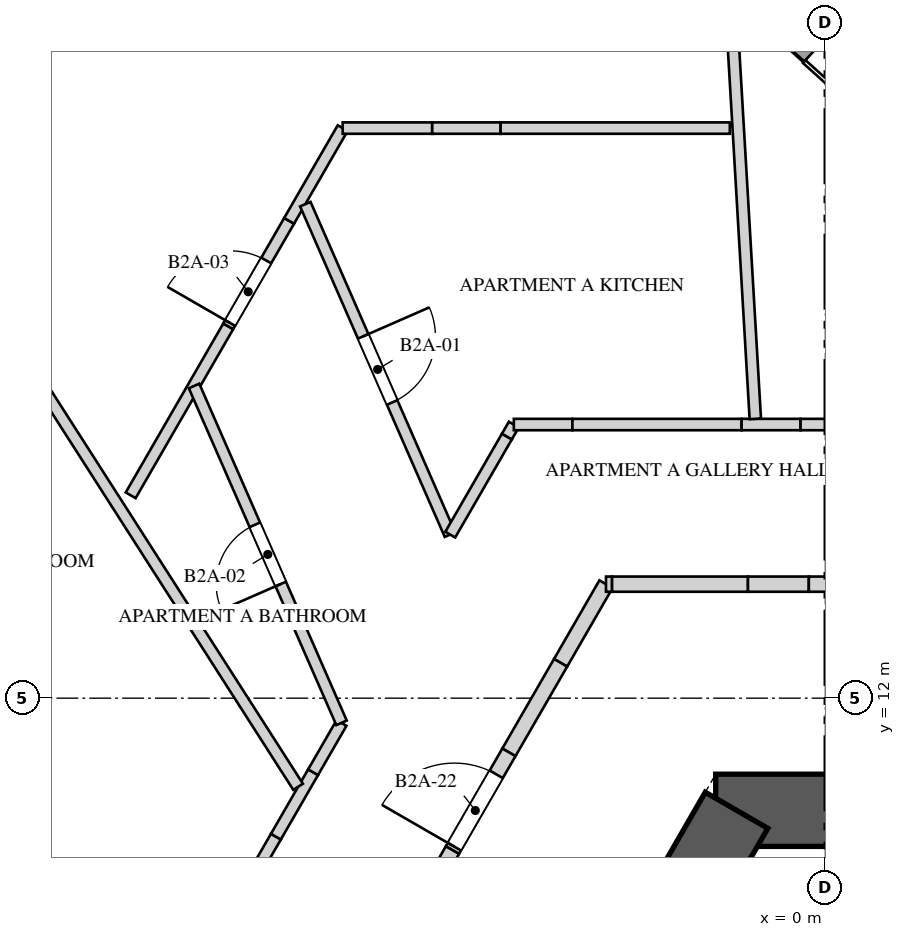
"""IFC4 building model, lengths in metres.
Left out: names, types, materials, properties, quantities, classifications, styles, units other than length and angle.
Written with IfcOpenShell. Run it as: python <this file> out.ifc"""

import sys

from ifc_helpers import new_model, si_unit, direction, frame, frame_2d, origin, place, context, subcontext, project, spatial, polyline, rectangle, outline, extrude, element, fill, save


model = new_model("IFC4")
c1 = context("Model", 3, precision=1e-05, world=origin(), true_north=direction((0.0, 1.0)))
c2 = subcontext(c1, "Body", "Model", "MODEL_VIEW")
j1 = project(units=[si_unit("LENGTHUNIT", "METRE"), si_unit("PLANEANGLEUNIT", "RADIAN")], contexts=[c1])
p1 = place(None, origin())
s1 = spatial("IfcSite", under=j1, at=p1, CompositionType="ELEMENT")
p2 = place(p1, origin())
s2 = spatial("IfcBuilding", under=s1, at=p2, CompositionType="ELEMENT")
p3 = place(p2, frame((0.0, 0.0, 88.4)))
s3 = spatial("IfcBuildingStorey", under=s2, at=p3, CompositionType="ELEMENT", Elevation=88.4)
p4 = place(p3, frame((1.443, 10.525, 0.0), z_axis=(0.0, 0.0, 1.0), x_axis=(-1.0, 0.0, 0.0)))
e1 = element("IfcWall", 1, at=p4, inside=s3, PredefinedType="SHEAR", context=c2, shape_type="SweptSolid", body=[
    extrude(rectangle(XDim=2.887, YDim=0.95, at=frame_2d((1.443, 0.0))), origin(), (0.0, 0.0, 1.0), 4.0),
])
p5 = place(p3, frame((-1.169, 10.525, 0.0), z_axis=(0.0, 0.0, 1.0), x_axis=(-0.499999102847, -0.866025921755, 0.0)))
e2 = element("IfcWall", 2, at=p5, inside=s3, PredefinedType="SHEAR", context=c2, shape_type="SweptSolid", body=[
    extrude(rectangle(XDim=17.061, YDim=0.95, at=frame_2d((8.53, 0.0))), origin(), (0.0, 0.0, 1.0), 4.0),
])
p6 = place(p5, frame((6.735, 0.0, 0.0)))
e3 = element("IfcOpeningElement", 3, at=p6, cuts=e2, PredefinedType="OPENING", context=c2, shape_type="SweptSolid", body=[
    extrude(rectangle(XDim=1.0, YDim=2.4, at=frame_2d((0.5, 1.2))), frame((0.0, 0.485, 0.0), z_axis=(0.0, -1.0, 0.0), x_axis=(1.0, 0.0, 0.0)), (0.0, 0.0, 1.0), 0.97),
])
p7 = place(p5, frame((14.613, 0.0, 0.0)))
e4 = element("IfcOpeningElement", 4, at=p7, cuts=e2, PredefinedType="OPENING", context=c2, shape_type="SweptSolid", body=[
    extrude(rectangle(XDim=0.8, YDim=2.1, at=frame_2d((0.4, 1.05))), frame((0.0, 0.485, 0.0), z_axis=(0.0, -1.0, 0.0), x_axis=(1.0, 0.0, 0.0)), (0.0, 0.0, 1.0), 0.97),
])
p8 = place(p3, frame((1.3, 19.149, 0.0), z_axis=(0.0, 0.0, 1.0), x_axis=(-0.743182653308, 0.669088591909, 0.0)))
e5 = element("IfcWall", 5, at=p8, inside=s3, PredefinedType="SOLIDWALL", context=c2, shape_type="SweptSolid", body=[
    extrude(rectangle(XDim=2.287, YDim=0.3, at=frame_2d((1.143, 0.0))), origin(), (0.0, 0.0, 1.0), 3.3),
])
p9 = place(p8, frame((0.293, 0.0, 0.0)))
e6 = element("IfcOpeningElement", 6, at=p9, cuts=e5, PredefinedType="OPENING", context=c2, shape_type="SweptSolid", body=[
    extrude(rectangle(XDim=1.7, YDim=2.4, at=frame_2d((0.85, 1.2))), frame((0.0, 0.16, 0.0), z_axis=(0.0, -1.0, 0.0), x_axis=(1.0, 0.0, 0.0)), (0.0, 0.0, 1.0), 0.32),
])
p10 = place(p3, frame((-8.809, 7.442, 0.0), z_axis=(0.0, 0.0, 1.0), x_axis=(0.500003371769, 0.866023457084, 0.0)))
e7 = element("IfcWall", 7, at=p10, inside=s3, PredefinedType="PARTITIONING", context=c2, shape_type="SweptSolid", body=[
    extrude(rectangle(XDim=3.16, YDim=0.15, at=frame_2d((1.58, 0.0))), origin(), (0.0, 0.0, 1.0), 3.65),
])
p11 = place(p10, frame((1.307, 0.0, 0.0)))
e8 = element("IfcOpeningElement", 8, at=p11, cuts=e7, PredefinedType="OPENING", context=c2, shape_type="SweptSolid", body=[
    extrude(rectangle(XDim=0.95, YDim=2.4, at=frame_2d((0.475, 1.2))), frame((0.0, 0.085, 0.0), z_axis=(0.0, -1.0, 0.0), x_axis=(1.0, 0.0, 0.0)), (0.0, 0.0, 1.0), 0.17),
])
p12 = place(p3, frame((-7.229, 10.178, 0.0), z_axis=(0.0, 0.0, 1.0), x_axis=(0.500082280366, 0.865977893981, 0.0)))
e9 = element("IfcWall", 9, at=p12, inside=s3, PredefinedType="PARTITIONING", context=c2, shape_type="SweptSolid", body=[
    extrude(rectangle(XDim=0.979, YDim=0.15, at=frame_2d((0.489, 0.0))), origin(), (0.0, 0.0, 1.0), 2.55),
])
p13 = place(p3, frame((-6.74, 11.026, 0.0), z_axis=(0.0, 0.0, 1.0), x_axis=(0.499826079786, 0.866125793385, 0.0)))
e10 = element("IfcWall", 10, at=p13, inside=s3, PredefinedType="PARTITIONING", context=c2, shape_type="SweptSolid", body=[
    extrude(rectangle(XDim=0.748, YDim=0.15, at=frame_2d((0.374, 0.0))), origin(), (0.0, 0.0, 1.0), 3.65),
])
p14 = place(p3, frame((-9.14, 14.669, 0.0), z_axis=(0.0, 0.0, 1.0), x_axis=(0.500016107458, 0.866016103939, 0.0)))
e11 = element("IfcWall", 11, at=p14, inside=s3, PredefinedType="PARTITIONING", context=c2, shape_type="SweptSolid", body=[
    extrude(rectangle(XDim=2.567, YDim=0.15, at=frame_2d((1.283, 0.0))), origin(), (0.0, 0.0, 1.0), 3.65),
])
p15 = place(p3, frame((-7.857, 16.892, 0.0), z_axis=(0.0, 0.0, 1.0), x_axis=(0.499973003918, 0.866040989419, 0.0)))
e12 = element("IfcWall", 12, at=p15, inside=s3, PredefinedType="PARTITIONING", context=c2, shape_type="SweptSolid", body=[
    extrude(outline(polyline([(0.0, 0.0), (1.603, 0.0), (1.603, 2.55), (0.498, 2.55), (0.498, 3.65), (0.0, 3.65), (0.0, 0.0)])), frame((0.0, 0.075, 0.0), z_axis=(0.0, -1.0, 0.0), x_axis=(1.0, 0.0, 0.0)), (0.0, 0.0, 1.0), 0.15),
])
p16 = place(p15, frame((0.05, 0.0, 0.0)))
e13 = element("IfcOpeningElement", 13, at=p16, cuts=e12, PredefinedType="OPENING", context=c2, shape_type="SweptSolid", body=[
    extrude(rectangle(XDim=0.95, YDim=2.4, at=frame_2d((0.475, 1.2))), frame((0.0, 0.085, 0.0), z_axis=(0.0, -1.0, 0.0), x_axis=(1.0, 0.0, 0.0)), (0.0, 0.0, 1.0), 0.17),
])
p17 = place(p3, frame((-7.055, 18.28, 0.0), z_axis=(0.0, 0.0, 1.0), x_axis=(0.500052415518, 0.865995139556, 0.0)))
e14 = element("IfcWall", 14, at=p17, inside=s3, PredefinedType="PARTITIONING", context=c2, shape_type="SweptSolid", body=[
    extrude(rectangle(XDim=1.409, YDim=0.15, at=frame_2d((0.705, 0.0))), origin(), (0.0, 0.0, 1.0), 3.65),
])
p18 = place(p3, frame((-9.004, 7.255, 0.0), z_axis=(0.0, 0.0, 1.0), x_axis=(-0.778684200607, 0.627416062692, 0.0)))
e15 = element("IfcWall", 15, at=p18, inside=s3, PredefinedType="PARTITIONING", context=c2, shape_type="SweptSolid", body=[
    extrude(rectangle(XDim=7.605, YDim=0.15, at=frame_2d((3.802, 0.0))), origin(), (0.0, 0.0, 1.0), 2.75),
])
p19 = place(p3, frame((-6.938, 10.834, 0.0), z_axis=(0.0, 0.0, 1.0), x_axis=(-0.539252318239, 0.842144249683, 0.0)))
e16 = element("IfcWall", 16, at=p19, inside=s3, PredefinedType="PARTITIONING", context=c2, shape_type="SweptSolid", body=[
    extrude(rectangle(XDim=11.475, YDim=0.15, at=frame_2d((5.737, 0.0))), origin(), (0.0, 0.0, 1.0), 2.55),
])
p20 = place(p3, frame((-6.842, 18.499, 0.0), z_axis=(0.0, 0.0, 1.0), x_axis=(0.400991537582, -0.916081757698, 0.0)))
e17 = element("IfcWall", 17, at=p20, inside=s3, PredefinedType="PARTITIONING", context=c2, shape_type="SweptSolid", body=[
    extrude(rectangle(XDim=4.746, YDim=0.15, at=frame_2d((2.373, 0.0))), origin(), (0.0, 0.0, 1.0), 3.65),
])
p21 = place(p20, frame((1.898, 0.0, 0.0)))
e18 = element("IfcOpeningElement", 18, at=p21, cuts=e17, PredefinedType="OPENING", context=c2, shape_type="SweptSolid", body=[
    extrude(rectangle(XDim=0.95, YDim=2.4, at=frame_2d((0.475, 1.2))), frame((0.0, 0.085, 0.0), z_axis=(0.0, -1.0, 0.0), x_axis=(1.0, 0.0, 0.0)), (0.0, 0.0, 1.0), 0.17),
])
p22 = place(p3, frame((-6.366, 11.675, 0.0), z_axis=(0.0, 0.0, 1.0), x_axis=(-0.401014713365, 0.916071612738, 0.0)))
e19 = element("IfcWall", 19, at=p22, inside=s3, PredefinedType="PARTITIONING", context=c2, shape_type="SweptSolid", body=[
    extrude(rectangle(XDim=4.838, YDim=0.15, at=frame_2d((2.419, 0.0))), origin(), (0.0, 0.0, 1.0), 3.65),
])
p23 = place(p22, frame((1.994, 0.0, 0.0)))
e20 = element("IfcOpeningElement", 20, at=p23, cuts=e19, PredefinedType="OPENING", context=c2, shape_type="SweptSolid", body=[
    extrude(rectangle(XDim=0.85, YDim=2.4, at=frame_2d((0.425, 1.2))), frame((0.0, 0.085, 0.0), z_axis=(0.0, -1.0, 0.0), x_axis=(1.0, 0.0, 0.0)), (0.0, 0.0, 1.0), 0.17),
])
p24 = place(p3, frame((-6.351, 19.5, 0.0), z_axis=(0.0, 0.0, 1.0), x_axis=(1.0, 0.0, 0.0)))
e21 = element("IfcWall", 21, at=p24, inside=s3, PredefinedType="PARTITIONING", context=c2, shape_type="SweptSolid", body=[
    extrude(rectangle(XDim=1.177, YDim=0.15, at=frame_2d((0.589, 0.0))), origin(), (0.0, 0.0, 1.0), 3.65),
])
p25 = place(p3, frame((-5.173, 19.5, 0.0), z_axis=(0.0, 0.0, 1.0), x_axis=(1.0, 0.0, 0.0)))
e22 = element("IfcWall", 22, at=p25, inside=s3, PredefinedType="PARTITIONING", context=c2, shape_type="SweptSolid", body=[
    extrude(rectangle(XDim=0.9, YDim=0.15, at=frame_2d((0.45, 0.0))), origin(), (0.0, 0.0, 1.0), 2.55),
])
p26 = place(p3, frame((-4.273, 19.5, 0.0), z_axis=(0.0, 0.0, 1.0), x_axis=(1.0, 0.0, 0.0)))
e23 = element("IfcWall", 23, at=p26, inside=s3, PredefinedType="PARTITIONING", context=c2, shape_type="SweptSolid", body=[
    extrude(rectangle(XDim=3.015, YDim=0.15, at=frame_2d((1.508, 0.0))), origin(), (0.0, 0.0, 1.0), 3.65),
])
p27 = place(p3, frame((-4.936, 14.151, 0.0), z_axis=(0.0, 0.0, 1.0), x_axis=(0.500015540671, 0.866016431188, 0.0)))
e24 = element("IfcWall", 24, at=p27, inside=s3, PredefinedType="PARTITIONING", context=c2, shape_type="SweptSolid", body=[
    extrude(rectangle(XDim=1.49, YDim=0.15, at=frame_2d((0.745, 0.0))), origin(), (0.0, 0.0, 1.0), 3.65),
])
p28 = place(p3, frame((-4.19, 15.442, 0.0), z_axis=(0.0, 0.0, 1.0), x_axis=(0.50045593687, 0.865762008436, 0.0)))
e25 = element("IfcWall", 25, at=p28, inside=s3, PredefinedType="PARTITIONING", context=c2, shape_type="SweptSolid", body=[
    extrude(rectangle(XDim=0.182, YDim=0.15, at=frame_2d((0.091, 0.0))), origin(), (0.0, 0.0, 1.0), 2.55),
])
p29 = place(p3, frame((-4.099, 15.6, 0.0), z_axis=(0.0, 0.0, 1.0), x_axis=(1.0, 0.0, 0.0)))
e26 = element("IfcWall", 26, at=p29, inside=s3, PredefinedType="PARTITIONING", context=c2, shape_type="SweptSolid", body=[
    extrude(rectangle(XDim=0.771, YDim=0.15, at=frame_2d((0.385, 0.0))), origin(), (0.0, 0.0, 1.0), 2.55),
])
p30 = place(p3, frame((-3.328, 15.6, 0.0), z_axis=(0.0, 0.0, 1.0), x_axis=(1.0, 0.0, 0.0)))
e27 = element("IfcWall", 27, at=p30, inside=s3, PredefinedType="PARTITIONING", context=c2, shape_type="SweptSolid", body=[
    extrude(rectangle(XDim=2.226, YDim=0.15, at=frame_2d((1.113, 0.0))), origin(), (0.0, 0.0, 1.0), 3.65),
])
p31 = place(p3, frame((-1.103, 15.6, 0.0), z_axis=(0.0, 0.0, 1.0), x_axis=(1.0, 0.0, 0.0)))
e28 = element("IfcWall", 28, at=p31, inside=s3, PredefinedType="PARTITIONING", context=c2, shape_type="SweptSolid", body=[
    extrude(rectangle(XDim=0.776, YDim=0.15, at=frame_2d((0.388, 0.0))), origin(), (0.0, 0.0, 1.0), 2.75),
])
p32 = place(p3, frame((-0.327, 15.6, 0.0), z_axis=(0.0, 0.0, 1.0), x_axis=(1.0, 0.0, 0.0)))
e29 = element("IfcWall", 29, at=p32, inside=s3, PredefinedType="PARTITIONING", context=c2, shape_type="SweptSolid", body=[
    extrude(rectangle(XDim=4.426, YDim=0.15, at=frame_2d((2.213, 0.0))), origin(), (0.0, 0.0, 1.0), 3.65),
])
p33 = place(p3, frame((-1.429, 24.297, 0.0), z_axis=(0.0, 0.0, 1.0), x_axis=(0.058736934744, -0.99827349584, 0.0)))
e30 = element("IfcWall", 30, at=p33, inside=s3, PredefinedType="PARTITIONING", context=c2, shape_type="SweptSolid", body=[
    extrude(rectangle(XDim=8.637, YDim=0.15, at=frame_2d((4.319, 0.0))), origin(), (0.0, 0.0, 1.0), 2.75),
])
p34 = place(p3, frame((-5.441, 9.076, 0.0), z_axis=(0.0, 0.0, 1.0), x_axis=(0.499920058375, 0.866071553184, 0.0)))
e31 = element("IfcWall", 31, at=p34, inside=s3, PredefinedType="SOLIDWALL", context=c2, shape_type="SweptSolid", body=[
    extrude(rectangle(XDim=1.07, YDim=0.2, at=frame_2d((0.535, 0.0))), origin(), (0.0, 0.0, 1.0), 3.65),
])
p35 = place(p3, frame((-4.906, 10.003, 0.0), z_axis=(0.0, 0.0, 1.0), x_axis=(0.500096935553, 0.865969430783, 0.0)))
e32 = element("IfcWall", 32, at=p35, inside=s3, PredefinedType="SOLIDWALL", context=c2, shape_type="SweptSolid", body=[
    extrude(outline(polyline([(0.0, 0.0), (1.486, 0.0), (1.486, 2.55), (0.35, 2.55), (0.35, 3.65), (0.0, 3.65), (0.0, 0.0)])), frame((0.0, 0.1, 0.0), z_axis=(0.0, -1.0, 0.0), x_axis=(1.0, 0.0, 0.0)), (0.0, 0.0, 1.0), 0.2),
])
p36 = place(p35, frame((0.05, 0.0, 0.0)))
e33 = element("IfcOpeningElement", 33, at=p36, cuts=e32, PredefinedType="OPENING", context=c2, shape_type="SweptSolid", body=[
    extrude(rectangle(XDim=1.1, YDim=2.4, at=frame_2d((0.55, 1.2))), frame((0.0, 0.11, 0.0), z_axis=(0.0, -1.0, 0.0), x_axis=(1.0, 0.0, 0.0)), (0.0, 0.0, 1.0), 0.22),
])
p37 = place(p3, frame((-4.163, 11.29, 0.0), z_axis=(0.0, 0.0, 1.0), x_axis=(0.499903734186, 0.866080975745, 0.0)))
e34 = element("IfcWall", 34, at=p37, inside=s3, PredefinedType="SOLIDWALL", context=c2, shape_type="SweptSolid", body=[
    extrude(rectangle(XDim=1.36, YDim=0.2, at=frame_2d((0.68, 0.0))), origin(), (0.0, 0.0, 1.0), 3.65),
])
p38 = place(p3, frame((-3.483, 12.468, 0.0), z_axis=(0.0, 0.0, 1.0), x_axis=(0.500059236744, 0.865991200733, 0.0)))
e35 = element("IfcWall", 35, at=p38, inside=s3, PredefinedType="SOLIDWALL", context=c2, shape_type="SweptSolid", body=[
    extrude(rectangle(XDim=1.192, YDim=0.2, at=frame_2d((0.596, 0.0))), origin(), (0.0, 0.0, 1.0), 2.55),
])
p39 = place(p3, frame((-2.887, 13.5, 0.0), z_axis=(0.0, 0.0, 1.0), x_axis=(1.0, 0.0, 0.0)))
e36 = element("IfcWall", 36, at=p39, inside=s3, PredefinedType="SOLIDWALL", context=c2, shape_type="SweptSolid", body=[
    extrude(rectangle(XDim=0.08, YDim=0.2, at=frame_2d((0.04, 0.0))), origin(), (0.0, 0.0, 1.0), 2.55),
])
p40 = place(p3, frame((-2.807, 13.5, 0.0), z_axis=(0.0, 0.0, 1.0), x_axis=(1.0, 0.0, 0.0)))
e37 = element("IfcWall", 37, at=p40, inside=s3, PredefinedType="SOLIDWALL", context=c2, shape_type="SweptSolid", body=[
    extrude(rectangle(XDim=1.788, YDim=0.2, at=frame_2d((0.894, 0.0))), origin(), (0.0, 0.0, 1.0), 3.65),
])
p41 = place(p3, frame((-1.019, 13.5, 0.0), z_axis=(0.0, 0.0, 1.0), x_axis=(1.0, 0.0, 0.0)))
e38 = element("IfcWall", 38, at=p41, inside=s3, PredefinedType="SOLIDWALL", context=c2, shape_type="SweptSolid", body=[
    extrude(rectangle(XDim=0.801, YDim=0.2, at=frame_2d((0.4, 0.0))), origin(), (0.0, 0.0, 1.0), 2.75),
])
p42 = place(p3, frame((-0.218, 13.5, 0.0), z_axis=(0.0, 0.0, 1.0), x_axis=(1.0, 0.0, 0.0)))
e39 = element("IfcWall", 39, at=p42, inside=s3, PredefinedType="SOLIDWALL", context=c2, shape_type="SweptSolid", body=[
    extrude(rectangle(XDim=3.105, YDim=0.2, at=frame_2d((1.552, 0.0))), origin(), (0.0, 0.0, 1.0), 3.65),
])
p43 = place(p9, origin())
e40 = element("IfcDoor", 40, at=p43, inside=s3, OperationType="SLIDING_TO_LEFT", PredefinedType="DOOR", context=c2, shape_type="SweptSolid", body=[
    extrude(rectangle(XDim=1.7, YDim=2.4, at=frame_2d((0.85, 1.2))), frame((0.0, 0.025, 0.0), z_axis=(0.0, -1.0, 0.0), x_axis=(1.0, 0.0, 0.0)), (0.0, 0.0, 1.0), 0.05),
])
fill(e6, e40)
p44 = place(p21, origin())
e41 = element("IfcDoor", 41, at=p44, inside=s3, OperationType="SINGLE_SWING_LEFT", PredefinedType="DOOR", context=c2, shape_type="SweptSolid", body=[
    extrude(rectangle(XDim=0.95, YDim=2.4, at=frame_2d((0.475, 1.2))), frame((0.0, 0.025, 0.0), z_axis=(0.0, -1.0, 0.0), x_axis=(1.0, 0.0, 0.0)), (0.0, 0.0, 1.0), 0.05),
])
fill(e18, e41)
p45 = place(p23, origin())
e42 = element("IfcDoor", 42, at=p45, inside=s3, OperationType="SINGLE_SWING_RIGHT", PredefinedType="DOOR", context=c2, shape_type="SweptSolid", body=[
    extrude(rectangle(XDim=0.85, YDim=2.4, at=frame_2d((0.425, 1.2))), frame((0.0, 0.025, 0.0), z_axis=(0.0, -1.0, 0.0), x_axis=(1.0, 0.0, 0.0)), (0.0, 0.0, 1.0), 0.05),
])
fill(e20, e42)
p46 = place(p16, origin())
e43 = element("IfcDoor", 43, at=p46, inside=s3, OperationType="SINGLE_SWING_LEFT", PredefinedType="DOOR", context=c2, shape_type="SweptSolid", body=[
    extrude(rectangle(XDim=0.95, YDim=2.4, at=frame_2d((0.475, 1.2))), frame((0.0, 0.025, 0.0), z_axis=(0.0, -1.0, 0.0), x_axis=(1.0, 0.0, 0.0)), (0.0, 0.0, 1.0), 0.05),
])
fill(e13, e43)
p47 = place(p36, origin())
e44 = element("IfcDoor", 44, at=p47, inside=s3, OperationType="SINGLE_SWING_RIGHT", PredefinedType="DOOR", context=c2, shape_type="SweptSolid", body=[
    extrude(rectangle(XDim=1.1, YDim=2.4, at=frame_2d((0.55, 1.2))), frame((0.0, 0.025, 0.0), z_axis=(0.0, -1.0, 0.0), x_axis=(1.0, 0.0, 0.0)), (0.0, 0.0, 1.0), 0.05),
])
fill(e33, e44)
save(model, sys.argv[1])
